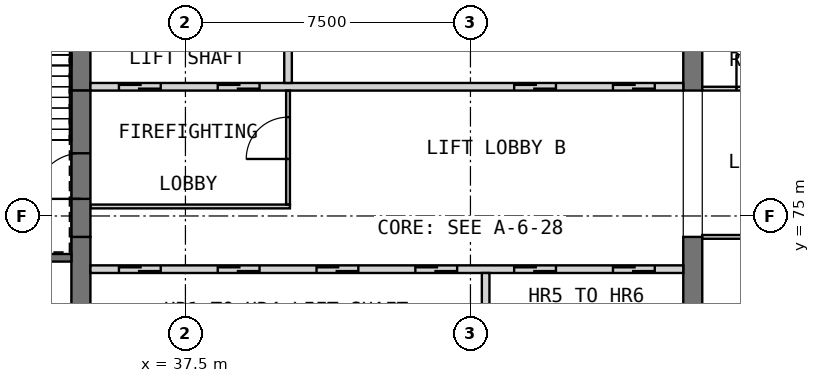
"""IFC4 building model, lengths in metres.
Left out: names, types, materials, properties, quantities, classifications, styles, units other than length and angle.
Written with IfcOpenShell. Run it as: python <this file> out.ifc"""

import sys

from ifc_helpers import new_model, si_unit, direction, frame, frame_2d, origin, place, context, subcontext, project, spatial, rectangle, extrude, element, fill, save


model = new_model("IFC4")
c1 = context("Model", 3, precision=1e-05, world=origin(), true_north=direction((0.0, 1.0)))
c2 = subcontext(c1, "Body", "Model", "MODEL_VIEW")
j1 = project(units=[si_unit("LENGTHUNIT", "METRE"), si_unit("PLANEANGLEUNIT", "RADIAN")], contexts=[c1])
p1 = place(None, origin())
s1 = spatial("IfcSite", under=j1, at=p1, CompositionType="ELEMENT")
p2 = place(p1, origin())
s2 = spatial("IfcBuilding", under=s1, at=p2, CompositionType="ELEMENT")
p3 = place(p2, frame((0.0, 0.0, 214.2)))
s3 = spatial("IfcBuildingStorey", under=s2, at=p3, CompositionType="ELEMENT", Elevation=214.2)
p4 = place(p3, frame((34.75, 68.05, 0.0), z_axis=(0.0, 0.0, 1.0), x_axis=(0.0, 1.0, 0.0)))
e1 = element("IfcWall", 1, at=p4, inside=s3, PredefinedType="SHEAR", context=c2, shape_type="SweptSolid", body=[
    extrude(rectangle(XDim=6.4, YDim=0.5, at=frame_2d((3.2, 0.0))), origin(), (0.0, 0.0, 1.0), 5.5),
])
p5 = place(p3, frame((34.75, 78.3, 0.0), z_axis=(0.0, 0.0, 1.0), x_axis=(0.0, 1.0, 0.0)))
e2 = element("IfcWall", 2, at=p5, inside=s3, PredefinedType="SHEAR", context=c2, shape_type="SweptSolid", body=[
    extrude(rectangle(XDim=3.4, YDim=0.5, at=frame_2d((1.7, 0.0))), origin(), (0.0, 0.0, 1.0), 5.5),
])
p6 = place(p3, frame((50.85, 68.05, 0.0), z_axis=(0.0, 0.0, 1.0), x_axis=(0.0, 1.0, 0.0)))
e3 = element("IfcWall", 3, at=p6, inside=s3, PredefinedType="SHEAR", context=c2, shape_type="SweptSolid", body=[
    extrude(rectangle(XDim=6.4, YDim=0.5, at=frame_2d((3.2, 0.0))), origin(), (0.0, 0.0, 1.0), 5.5),
])
p7 = place(p3, frame((50.85, 78.3, 0.0), z_axis=(0.0, 0.0, 1.0), x_axis=(0.0, 1.0, 0.0)))
e4 = element("IfcWall", 4, at=p7, inside=s3, PredefinedType="SHEAR", context=c2, shape_type="SweptSolid", body=[
    extrude(rectangle(XDim=3.4, YDim=0.5, at=frame_2d((1.7, 0.0))), origin(), (0.0, 0.0, 1.0), 5.5),
])
p8 = place(p3, frame((35.0, 73.6, 0.0), z_axis=(0.0, 0.0, 1.0), x_axis=(1.0, 0.0, 0.0)))
e5 = element("IfcWall", 5, at=p8, inside=s3, PredefinedType="SOLIDWALL", context=c2, shape_type="SweptSolid", body=[
    extrude(rectangle(XDim=15.6, YDim=0.2, at=frame_2d((7.8, 0.0))), origin(), (0.0, 0.0, 1.0), 5.5),
])
p9 = place(p8, frame((0.75, 0.0, 0.0)))
e6 = element("IfcOpeningElement", 6, at=p9, cuts=e5, PredefinedType="OPENING", context=c2, shape_type="SweptSolid", body=[
    extrude(rectangle(XDim=1.1, YDim=2.1, at=frame_2d((0.55, 1.05))), frame((0.0, 0.11, 0.0), z_axis=(0.0, -1.0, 0.0), x_axis=(1.0, 0.0, 0.0)), (0.0, 0.0, 1.0), 0.22),
])
p10 = place(p8, frame((3.35, 0.0, 0.0)))
e7 = element("IfcOpeningElement", 7, at=p10, cuts=e5, PredefinedType="OPENING", context=c2, shape_type="SweptSolid", body=[
    extrude(rectangle(XDim=1.1, YDim=2.1, at=frame_2d((0.55, 1.05))), frame((0.0, 0.11, 0.0), z_axis=(0.0, -1.0, 0.0), x_axis=(1.0, 0.0, 0.0)), (0.0, 0.0, 1.0), 0.22),
])
p11 = place(p8, frame((5.95, 0.0, 0.0)))
e8 = element("IfcOpeningElement", 8, at=p11, cuts=e5, PredefinedType="OPENING", context=c2, shape_type="SweptSolid", body=[
    extrude(rectangle(XDim=1.1, YDim=2.1, at=frame_2d((0.55, 1.05))), frame((0.0, 0.11, 0.0), z_axis=(0.0, -1.0, 0.0), x_axis=(1.0, 0.0, 0.0)), (0.0, 0.0, 1.0), 0.22),
])
p12 = place(p8, frame((8.55, 0.0, 0.0)))
e9 = element("IfcOpeningElement", 9, at=p12, cuts=e5, PredefinedType="OPENING", context=c2, shape_type="SweptSolid", body=[
    extrude(rectangle(XDim=1.1, YDim=2.1, at=frame_2d((0.55, 1.05))), frame((0.0, 0.11, 0.0), z_axis=(0.0, -1.0, 0.0), x_axis=(1.0, 0.0, 0.0)), (0.0, 0.0, 1.0), 0.22),
])
p13 = place(p8, frame((11.15, 0.0, 0.0)))
e10 = element("IfcOpeningElement", 10, at=p13, cuts=e5, PredefinedType="OPENING", context=c2, shape_type="SweptSolid", body=[
    extrude(rectangle(XDim=1.1, YDim=2.1, at=frame_2d((0.55, 1.05))), frame((0.0, 0.11, 0.0), z_axis=(0.0, -1.0, 0.0), x_axis=(1.0, 0.0, 0.0)), (0.0, 0.0, 1.0), 0.22),
])
p14 = place(p8, frame((13.75, 0.0, 0.0)))
e11 = element("IfcOpeningElement", 11, at=p14, cuts=e5, PredefinedType="OPENING", context=c2, shape_type="SweptSolid", body=[
    extrude(rectangle(XDim=1.1, YDim=2.1, at=frame_2d((0.55, 1.05))), frame((0.0, 0.11, 0.0), z_axis=(0.0, -1.0, 0.0), x_axis=(1.0, 0.0, 0.0)), (0.0, 0.0, 1.0), 0.22),
])
p15 = place(p3, frame((45.4, 71.5, 0.0), z_axis=(0.0, 0.0, 1.0), x_axis=(0.0, 1.0, 0.0)))
e12 = element("IfcWall", 12, at=p15, inside=s3, PredefinedType="SOLIDWALL", context=c2, shape_type="SweptSolid", body=[
    extrude(rectangle(XDim=2.0, YDim=0.2, at=frame_2d((1.0, 0.0))), origin(), (0.0, 0.0, 1.0), 5.5),
])
p16 = place(p3, frame((35.0, 78.4, 0.0), z_axis=(0.0, 0.0, 1.0), x_axis=(1.0, 0.0, 0.0)))
e13 = element("IfcWall", 13, at=p16, inside=s3, PredefinedType="SOLIDWALL", context=c2, shape_type="SweptSolid", body=[
    extrude(rectangle(XDim=15.6, YDim=0.2, at=frame_2d((7.8, 0.0))), origin(), (0.0, 0.0, 1.0), 5.5),
])
p17 = place(p16, frame((0.75, 0.0, 0.0)))
e14 = element("IfcOpeningElement", 14, at=p17, cuts=e13, PredefinedType="OPENING", context=c2, shape_type="SweptSolid", body=[
    extrude(rectangle(XDim=1.1, YDim=2.1, at=frame_2d((0.55, 1.05))), frame((0.0, 0.11, 0.0), z_axis=(0.0, -1.0, 0.0), x_axis=(1.0, 0.0, 0.0)), (0.0, 0.0, 1.0), 0.22),
])
p18 = place(p16, frame((3.35, 0.0, 0.0)))
e15 = element("IfcOpeningElement", 15, at=p18, cuts=e13, PredefinedType="OPENING", context=c2, shape_type="SweptSolid", body=[
    extrude(rectangle(XDim=1.1, YDim=2.1, at=frame_2d((0.55, 1.05))), frame((0.0, 0.11, 0.0), z_axis=(0.0, -1.0, 0.0), x_axis=(1.0, 0.0, 0.0)), (0.0, 0.0, 1.0), 0.22),
])
p19 = place(p16, frame((11.15, 0.0, 0.0)))
e16 = element("IfcOpeningElement", 16, at=p19, cuts=e13, PredefinedType="OPENING", context=c2, shape_type="SweptSolid", body=[
    extrude(rectangle(XDim=1.1, YDim=2.1, at=frame_2d((0.55, 1.05))), frame((0.0, 0.11, 0.0), z_axis=(0.0, -1.0, 0.0), x_axis=(1.0, 0.0, 0.0)), (0.0, 0.0, 1.0), 0.22),
])
p20 = place(p16, frame((13.75, 0.0, 0.0)))
e17 = element("IfcOpeningElement", 17, at=p20, cuts=e13, PredefinedType="OPENING", context=c2, shape_type="SweptSolid", body=[
    extrude(rectangle(XDim=1.1, YDim=2.1, at=frame_2d((0.55, 1.05))), frame((0.0, 0.11, 0.0), z_axis=(0.0, -1.0, 0.0), x_axis=(1.0, 0.0, 0.0)), (0.0, 0.0, 1.0), 0.22),
])
p21 = place(p3, frame((40.2, 78.5, 0.0), z_axis=(0.0, 0.0, 1.0), x_axis=(0.0, 1.0, 0.0)))
e18 = element("IfcWall", 18, at=p21, inside=s3, PredefinedType="SOLIDWALL", context=c2, shape_type="SweptSolid", body=[
    extrude(rectangle(XDim=3.2, YDim=0.2, at=frame_2d((1.6, 0.0))), origin(), (0.0, 0.0, 1.0), 5.5),
])
p22 = place(p3, frame((35.0, 75.25, 0.0), z_axis=(0.0, 0.0, 1.0), x_axis=(1.0, 0.0, 0.0)))
e19 = element("IfcWall", 19, at=p22, inside=s3, PredefinedType="PARTITIONING", context=c2, shape_type="SweptSolid", body=[
    extrude(rectangle(XDim=5.25, YDim=0.1, at=frame_2d((2.625, 0.0))), origin(), (0.0, 0.0, 1.0), 5.25),
])
p23 = place(p3, frame((40.2, 75.3, 0.0), z_axis=(0.0, 0.0, 1.0), x_axis=(0.0, 1.0, 0.0)))
e20 = element("IfcWall", 20, at=p23, inside=s3, PredefinedType="PARTITIONING", context=c2, shape_type="SweptSolid", body=[
    extrude(rectangle(XDim=3.0, YDim=0.1, at=frame_2d((1.5, 0.0))), origin(), (0.0, 0.0, 1.0), 5.25),
])
p24 = place(p23, frame((1.2, 0.0, 0.0)))
e21 = element("IfcOpeningElement", 21, at=p24, cuts=e20, PredefinedType="OPENING", context=c2, shape_type="SweptSolid", body=[
    extrude(rectangle(XDim=1.1, YDim=2.1, at=frame_2d((0.55, 1.05))), frame((0.0, 0.06, 0.0), z_axis=(0.0, -1.0, 0.0), x_axis=(1.0, 0.0, 0.0)), (0.0, 0.0, 1.0), 0.12),
])
p25 = place(p3, frame((34.75, 74.45, 0.0), z_axis=(0.0, 0.0, 1.0), x_axis=(0.0, 1.0, 0.0)))
e22 = element("IfcWall", 22, at=p25, inside=s3, PredefinedType="SOLIDWALL", context=c2, shape_type="SweptSolid", body=[
    extrude(rectangle(XDim=3.85, YDim=0.5, at=frame_2d((1.925, 0.0))), origin(), (0.0, 0.0, 1.0), 4.3),
])
p26 = place(p25, frame((1.0, 0.0, 0.0)))
e23 = element("IfcOpeningElement", 23, at=p26, cuts=e22, PredefinedType="OPENING", context=c2, shape_type="SweptSolid", body=[
    extrude(rectangle(XDim=1.2, YDim=2.1, at=frame_2d((0.6, 1.05))), frame((0.0, 0.26, 0.0), z_axis=(0.0, -1.0, 0.0), x_axis=(1.0, 0.0, 0.0)), (0.0, 0.0, 1.0), 0.52),
])
p27 = place(p3, frame((30.8, 73.9, 0.0), z_axis=(0.0, 0.0, 1.0), x_axis=(1.0, 0.0, 0.0)))
e24 = element("IfcWall", 24, at=p27, inside=s3, PredefinedType="SOLIDWALL", context=c2, shape_type="SweptSolid", body=[
    extrude(rectangle(XDim=3.7, YDim=0.2, at=frame_2d((1.85, 0.0))), origin(), (0.0, 0.0, 1.0), 5.25),
])
p28 = place(p27, frame((1.5, 0.0, 0.0)))
e25 = element("IfcOpeningElement", 25, at=p28, cuts=e24, PredefinedType="OPENING", context=c2, shape_type="SweptSolid", body=[
    extrude(rectangle(XDim=0.9, YDim=2.1, at=frame_2d((0.45, 1.05))), frame((0.0, 0.11, 0.0), z_axis=(0.0, -1.0, 0.0), x_axis=(1.0, 0.0, 0.0)), (0.0, 0.0, 1.0), 0.22),
])
p29 = place(p3, frame((51.1, 74.45, 0.0), z_axis=(0.0, 0.0, 1.0), x_axis=(1.0, 0.0, 0.0)))
e26 = element("IfcWall", 26, at=p29, inside=s3, PredefinedType="PARTITIONING", context=c2, shape_type="SweptSolid", body=[
    extrude(rectangle(XDim=8.1, YDim=0.1, at=frame_2d((4.05, 0.0))), origin(), (0.0, 0.0, 1.0), 5.25),
])
p30 = place(p29, frame((3.6, 0.0, 0.0)))
e27 = element("IfcOpeningElement", 27, at=p30, cuts=e26, PredefinedType="OPENING", context=c2, shape_type="SweptSolid", body=[
    extrude(rectangle(XDim=0.9, YDim=2.1, at=frame_2d((0.45, 1.05))), frame((0.0, 0.06, 0.0), z_axis=(0.0, -1.0, 0.0), x_axis=(1.0, 0.0, 0.0)), (0.0, 0.0, 1.0), 0.12),
])
p31 = place(p3, frame((51.1, 78.35, 0.0), z_axis=(0.0, 0.0, 1.0), x_axis=(1.0, 0.0, 0.0)))
e28 = element("IfcWall", 28, at=p31, inside=s3, PredefinedType="PARTITIONING", context=c2, shape_type="SweptSolid", body=[
    extrude(rectangle(XDim=8.1, YDim=0.1, at=frame_2d((4.05, 0.0))), origin(), (0.0, 0.0, 1.0), 5.25),
])
p32 = place(p31, frame((0.9, 0.0, 0.0)))
e29 = element("IfcOpeningElement", 29, at=p32, cuts=e28, PredefinedType="OPENING", context=c2, shape_type="SweptSolid", body=[
    extrude(rectangle(XDim=0.9, YDim=2.1, at=frame_2d((0.45, 1.05))), frame((0.0, 0.06, 0.0), z_axis=(0.0, -1.0, 0.0), x_axis=(1.0, 0.0, 0.0)), (0.0, 0.0, 1.0), 0.12),
])
p33 = place(p31, frame((4.95, 0.0, 0.0)))
e30 = element("IfcOpeningElement", 30, at=p33, cuts=e28, PredefinedType="OPENING", context=c2, shape_type="SweptSolid", body=[
    extrude(rectangle(XDim=0.9, YDim=2.1, at=frame_2d((0.45, 1.05))), frame((0.0, 0.06, 0.0), z_axis=(0.0, -1.0, 0.0), x_axis=(1.0, 0.0, 0.0)), (0.0, 0.0, 1.0), 0.12),
])
p34 = place(p9, origin())
e31 = element("IfcDoor", 31, at=p34, inside=s3, OperationType="DOUBLE_DOOR_SLIDING", PredefinedType="DOOR", context=c2, shape_type="SweptSolid", body=[
    extrude(rectangle(XDim=1.1, YDim=2.1, at=frame_2d((0.55, 1.05))), frame((0.0, 0.025, 0.0), z_axis=(0.0, -1.0, 0.0), x_axis=(1.0, 0.0, 0.0)), (0.0, 0.0, 1.0), 0.05),
])
fill(e6, e31)
p35 = place(p10, origin())
e32 = element("IfcDoor", 32, at=p35, inside=s3, OperationType="DOUBLE_DOOR_SLIDING", PredefinedType="DOOR", context=c2, shape_type="SweptSolid", body=[
    extrude(rectangle(XDim=1.1, YDim=2.1, at=frame_2d((0.55, 1.05))), frame((0.0, 0.025, 0.0), z_axis=(0.0, -1.0, 0.0), x_axis=(1.0, 0.0, 0.0)), (0.0, 0.0, 1.0), 0.05),
])
fill(e7, e32)
p36 = place(p11, origin())
e33 = element("IfcDoor", 33, at=p36, inside=s3, OperationType="DOUBLE_DOOR_SLIDING", PredefinedType="DOOR", context=c2, shape_type="SweptSolid", body=[
    extrude(rectangle(XDim=1.1, YDim=2.1, at=frame_2d((0.55, 1.05))), frame((0.0, 0.025, 0.0), z_axis=(0.0, -1.0, 0.0), x_axis=(1.0, 0.0, 0.0)), (0.0, 0.0, 1.0), 0.05),
])
fill(e8, e33)
p37 = place(p12, origin())
e34 = element("IfcDoor", 34, at=p37, inside=s3, OperationType="DOUBLE_DOOR_SLIDING", PredefinedType="DOOR", context=c2, shape_type="SweptSolid", body=[
    extrude(rectangle(XDim=1.1, YDim=2.1, at=frame_2d((0.55, 1.05))), frame((0.0, 0.025, 0.0), z_axis=(0.0, -1.0, 0.0), x_axis=(1.0, 0.0, 0.0)), (0.0, 0.0, 1.0), 0.05),
])
fill(e9, e34)
p38 = place(p13, origin())
e35 = element("IfcDoor", 35, at=p38, inside=s3, OperationType="DOUBLE_DOOR_SLIDING", PredefinedType="DOOR", context=c2, shape_type="SweptSolid", body=[
    extrude(rectangle(XDim=1.1, YDim=2.1, at=frame_2d((0.55, 1.05))), frame((0.0, 0.025, 0.0), z_axis=(0.0, -1.0, 0.0), x_axis=(1.0, 0.0, 0.0)), (0.0, 0.0, 1.0), 0.05),
])
fill(e10, e35)
p39 = place(p14, origin())
e36 = element("IfcDoor", 36, at=p39, inside=s3, OperationType="DOUBLE_DOOR_SLIDING", PredefinedType="DOOR", context=c2, shape_type="SweptSolid", body=[
    extrude(rectangle(XDim=1.1, YDim=2.1, at=frame_2d((0.55, 1.05))), frame((0.0, 0.025, 0.0), z_axis=(0.0, -1.0, 0.0), x_axis=(1.0, 0.0, 0.0)), (0.0, 0.0, 1.0), 0.05),
])
fill(e11, e36)
p40 = place(p17, origin())
e37 = element("IfcDoor", 37, at=p40, inside=s3, OperationType="DOUBLE_DOOR_SLIDING", PredefinedType="DOOR", context=c2, shape_type="SweptSolid", body=[
    extrude(rectangle(XDim=1.1, YDim=2.1, at=frame_2d((0.55, 1.05))), frame((0.0, 0.025, 0.0), z_axis=(0.0, -1.0, 0.0), x_axis=(1.0, 0.0, 0.0)), (0.0, 0.0, 1.0), 0.05),
])
fill(e14, e37)
p41 = place(p18, origin())
e38 = element("IfcDoor", 38, at=p41, inside=s3, OperationType="DOUBLE_DOOR_SLIDING", PredefinedType="DOOR", context=c2, shape_type="SweptSolid", body=[
    extrude(rectangle(XDim=1.1, YDim=2.1, at=frame_2d((0.55, 1.05))), frame((0.0, 0.025, 0.0), z_axis=(0.0, -1.0, 0.0), x_axis=(1.0, 0.0, 0.0)), (0.0, 0.0, 1.0), 0.05),
])
fill(e15, e38)
p42 = place(p19, origin())
e39 = element("IfcDoor", 39, at=p42, inside=s3, OperationType="DOUBLE_DOOR_SLIDING", PredefinedType="DOOR", context=c2, shape_type="SweptSolid", body=[
    extrude(rectangle(XDim=1.1, YDim=2.1, at=frame_2d((0.55, 1.05))), frame((0.0, 0.025, 0.0), z_axis=(0.0, -1.0, 0.0), x_axis=(1.0, 0.0, 0.0)), (0.0, 0.0, 1.0), 0.05),
])
fill(e16, e39)
p43 = place(p20, origin())
e40 = element("IfcDoor", 40, at=p43, inside=s3, OperationType="DOUBLE_DOOR_SLIDING", PredefinedType="DOOR", context=c2, shape_type="SweptSolid", body=[
    extrude(rectangle(XDim=1.1, YDim=2.1, at=frame_2d((0.55, 1.05))), frame((0.0, 0.025, 0.0), z_axis=(0.0, -1.0, 0.0), x_axis=(1.0, 0.0, 0.0)), (0.0, 0.0, 1.0), 0.05),
])
fill(e17, e40)
p44 = place(p24, origin())
e41 = element("IfcDoor", 41, at=p44, inside=s3, OperationType="SINGLE_SWING_LEFT", PredefinedType="DOOR", context=c2, shape_type="SweptSolid", body=[
    extrude(rectangle(XDim=1.1, YDim=2.1, at=frame_2d((0.55, 1.05))), frame((0.0, 0.025, 0.0), z_axis=(0.0, -1.0, 0.0), x_axis=(1.0, 0.0, 0.0)), (0.0, 0.0, 1.0), 0.05),
])
fill(e21, e41)
p45 = place(p26, origin())
e42 = element("IfcDoor", 42, at=p45, inside=s3, OperationType="SINGLE_SWING_RIGHT", PredefinedType="DOOR", context=c2, shape_type="SweptSolid", body=[
    extrude(rectangle(XDim=1.2, YDim=2.1, at=frame_2d((0.6, 1.05))), frame((0.0, 0.025, 0.0), z_axis=(0.0, -1.0, 0.0), x_axis=(1.0, 0.0, 0.0)), (0.0, 0.0, 1.0), 0.05),
])
fill(e23, e42)
p46 = place(p32, origin())
e43 = element("IfcDoor", 43, at=p46, inside=s3, OperationType="SINGLE_SWING_LEFT", PredefinedType="DOOR", context=c2, shape_type="SweptSolid", body=[
    extrude(rectangle(XDim=0.9, YDim=2.1, at=frame_2d((0.45, 1.05))), frame((0.0, 0.025, 0.0), z_axis=(0.0, -1.0, 0.0), x_axis=(1.0, 0.0, 0.0)), (0.0, 0.0, 1.0), 0.05),
])
fill(e29, e43)
save(model, sys.argv[1])
